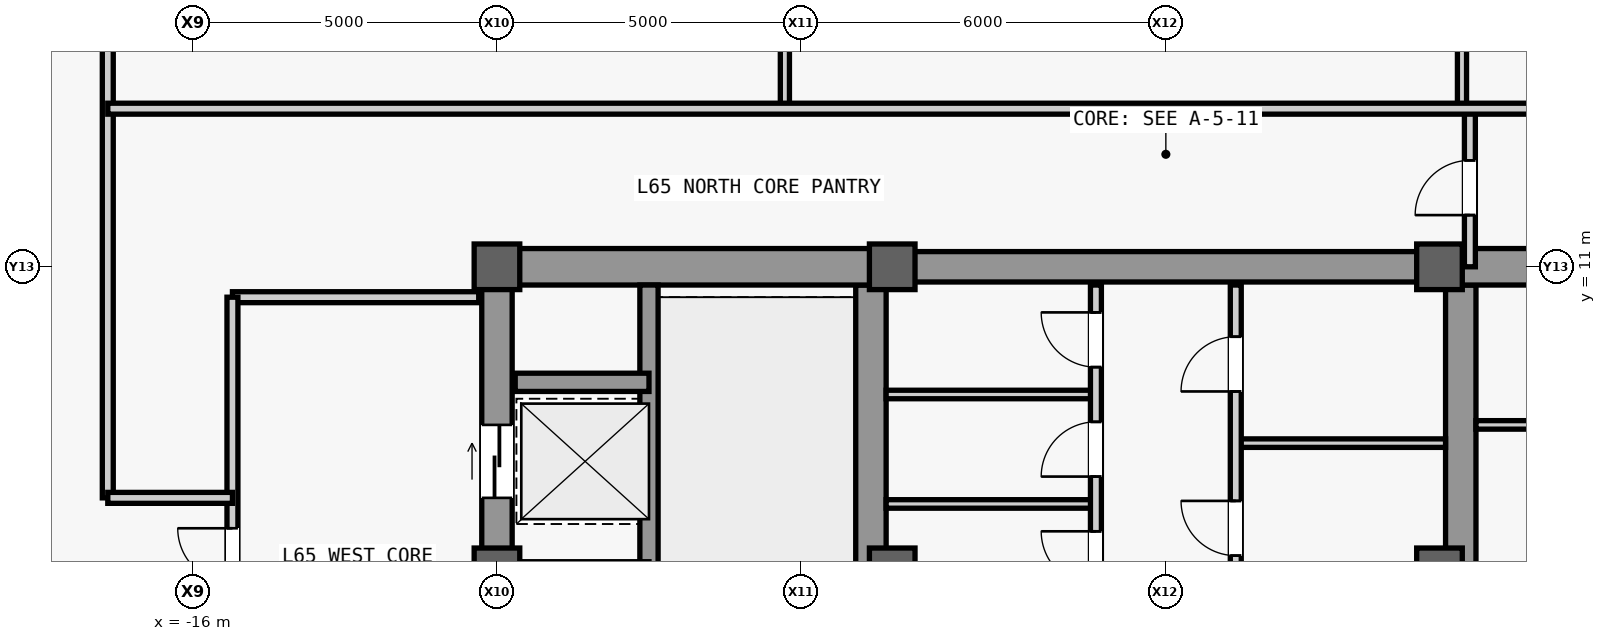
"""IFC4 building model, lengths in metres.
Left out: names, types, materials, properties, quantities, classifications, styles, units other than length and angle.
Written with IfcOpenShell. Run it as: python <this file> out.ifc"""

import sys

from ifc_helpers import new_model, si_unit, direction, frame, frame_2d, origin, origin_2d, place, context, subcontext, project, spatial, rectangle, extrude, source, transform, mapped, element, fill, save


model = new_model("IFC4")
c1 = context("Model", 3, precision=1e-05, world=origin(), true_north=direction((0.0, 1.0)))
c2 = subcontext(c1, "Body", "Model", "MODEL_VIEW")
j1 = project(units=[si_unit("LENGTHUNIT", "METRE"), si_unit("PLANEANGLEUNIT", "RADIAN")], contexts=[c1])
p1 = place(None, origin())
s1 = spatial("IfcSite", under=j1, at=p1, CompositionType="ELEMENT")
p2 = place(p1, origin())
s2 = spatial("IfcBuilding", under=s1, at=p2, CompositionType="ELEMENT")
p3 = place(p2, frame((0.0, 0.0, 277.5)))
s3 = spatial("IfcBuildingStorey", under=s2, at=p3, CompositionType="ELEMENT", Elevation=277.5)
m1 = source(origin(), c2, "Body", "SweptSolid", [
    extrude(rectangle(XDim=22.0, YDim=0.5, at=frame_2d((11.0, 0.0))), origin(), (0.0, 0.0, 1.0), 3.78),
])
p4 = place(p3, frame((-11.0, -11.0, 0.0), z_axis=(0.0, 0.0, 1.0), x_axis=(0.0, 1.0, 0.0)))
e1 = element("IfcWall", 1, at=p4, inside=s3, PredefinedType="SHEAR", context=c2, shape_type="MappedRepresentation", body=[
    mapped(m1, transform((0.0, 0.0, 0.0), scale=1.0)),
])
m2 = source(origin(), c2, "Body", "SweptSolid", [
    extrude(rectangle(XDim=1.1, YDim=2.2, at=frame_2d((0.55, 1.1))), frame((0.0, 0.26, 0.0), z_axis=(0.0, -1.0, 0.0), x_axis=(1.0, 0.0, 0.0)), (0.0, 0.0, 1.0), 0.52),
])
p5 = place(p4, frame((0.8, 0.0, 0.0)))
e2 = element("IfcOpeningElement", 2, at=p5, cuts=e1, PredefinedType="OPENING", context=c2, shape_type="MappedRepresentation", body=[
    mapped(m2, transform((0.0, 0.0, 0.0), scale=1.0)),
])
p6 = place(p4, frame((12.5, 0.0, 0.0)))
e3 = element("IfcOpeningElement", 3, at=p6, cuts=e1, PredefinedType="OPENING", context=c2, shape_type="MappedRepresentation", body=[
    mapped(m2, transform((0.0, 0.0, 0.0), scale=1.0)),
])
m3 = source(origin(), c2, "Body", "SweptSolid", [
    extrude(rectangle(XDim=0.9, YDim=2.15, at=frame_2d((0.45, 1.075))), frame((0.0, 0.26, 0.0), z_axis=(0.0, -1.0, 0.0), x_axis=(1.0, 0.0, 0.0)), (0.0, 0.0, 1.0), 0.52),
])
p7 = place(p4, frame((6.2, 0.0, 0.0)))
e4 = element("IfcOpeningElement", 4, at=p7, cuts=e1, PredefinedType="OPENING", context=c2, shape_type="MappedRepresentation", body=[
    mapped(m3, transform((0.0, 0.0, 0.0), scale=1.0)),
])
p8 = place(p4, frame((8.525, 0.0, 0.0)))
e5 = element("IfcOpeningElement", 5, at=p8, cuts=e1, PredefinedType="OPENING", context=c2, shape_type="MappedRepresentation", body=[
    mapped(m3, transform((0.0, 0.0, 0.0), scale=1.0)),
])
m4 = source(origin(), c2, "Body", "SweptSolid", [
    extrude(rectangle(XDim=1.2, YDim=2.3, at=frame_2d((0.6, 1.15))), frame((0.0, 0.26, 0.0), z_axis=(0.0, -1.0, 0.0), x_axis=(1.0, 0.0, 0.0)), (0.0, 0.0, 1.0), 0.52),
])
p9 = place(p4, frame((14.6, 0.0, 0.0)))
e6 = element("IfcOpeningElement", 6, at=p9, cuts=e1, PredefinedType="OPENING", context=c2, shape_type="MappedRepresentation", body=[
    mapped(m4, transform((0.0, 0.0, 0.0), scale=1.0)),
])
p10 = place(p4, frame((18.2, 0.0, 0.0)))
e7 = element("IfcOpeningElement", 7, at=p10, cuts=e1, PredefinedType="OPENING", context=c2, shape_type="MappedRepresentation", body=[
    mapped(m4, transform((0.0, 0.0, 0.0), scale=1.0)),
])
m5 = source(origin(), c2, "Body", "SweptSolid", [
    extrude(rectangle(XDim=1.3, YDim=2.3, at=frame_2d((0.65, 1.15))), frame((0.0, 0.26, 0.0), z_axis=(0.0, -1.0, 0.0), x_axis=(1.0, 0.0, 0.0)), (0.0, 0.0, 1.0), 0.52),
])
p11 = place(p4, frame((2.7, 0.0, 0.0)))
e8 = element("IfcOpeningElement", 8, at=p11, cuts=e1, PredefinedType="OPENING", context=c2, shape_type="MappedRepresentation", body=[
    mapped(m5, transform((0.0, 0.0, 0.0), scale=1.0)),
])
m6 = source(origin(), c2, "Body", "SweptSolid", [
    extrude(rectangle(XDim=21.4, YDim=0.5, at=frame_2d((10.7, 0.0))), origin(), (0.0, 0.0, 1.0), 3.78),
])
for number, where, z_axis, x_axis in (
    (9, (-4.85, -10.7, 0.0), (0.0, 0.0, 1.0), (0.0, 1.0, 0.0)),
    (10, (4.85, -10.7, 0.0), (0.0, 0.0, 1.0), (0.0, 1.0, 0.0)),
):
    element("IfcWall", number, at=place(p3, frame(where, z_axis=z_axis, x_axis=x_axis)), inside=s3, PredefinedType="SHEAR", context=c2, shape_type="MappedRepresentation", body=[
        mapped(m6, transform((0.0, 0.0, 0.0), scale=1.0)),
    ])
m7 = source(origin(), c2, "Body", "SweptSolid", [
    extrude(rectangle(XDim=5.9, YDim=0.6, at=frame_2d((2.95, 0.0))), origin(), (0.0, 0.0, 1.0), 3.78),
])
p12 = place(p3, frame((-10.75, 11.0, 0.0), z_axis=(0.0, 0.0, 1.0), x_axis=(1.0, 0.0, 0.0)))
e11 = element("IfcWall", 11, at=p12, inside=s3, PredefinedType="SHEAR", context=c2, shape_type="MappedRepresentation", body=[
    mapped(m7, transform((0.0, 0.0, 0.0), scale=1.0)),
])
p13 = place(p3, frame((4.85, 11.0, 0.0), z_axis=(0.0, 0.0, 1.0), x_axis=(1.0, 0.0, 0.0)))
e12 = element("IfcWall", 12, at=p13, inside=s3, PredefinedType="SHEAR", context=c2, shape_type="MappedRepresentation", body=[
    mapped(m7, transform((0.0, 0.0, 0.0), scale=1.0)),
])
m8 = source(origin(), c2, "Body", "SweptSolid", [
    extrude(rectangle(XDim=1.05, YDim=2.2, at=frame_2d((0.525, 1.1))), frame((0.0, 0.31, 0.0), z_axis=(0.0, -1.0, 0.0), x_axis=(1.0, 0.0, 0.0)), (0.0, 0.0, 1.0), 0.62),
])
p14 = place(p13, frame((1.375, 0.0, 0.0)))
e13 = element("IfcOpeningElement", 13, at=p14, cuts=e12, PredefinedType="OPENING", context=c2, shape_type="MappedRepresentation", body=[
    mapped(m8, transform((0.0, 0.0, 0.0), scale=1.0)),
])
m9 = source(origin(), c2, "Body", "SweptSolid", [
    extrude(rectangle(XDim=9.2, YDim=0.5, at=frame_2d((4.6, 0.0))), origin(), (0.0, 0.0, 1.0), 3.78),
])
p15 = place(p3, frame((-4.6, 11.0, 0.0), z_axis=(0.0, 0.0, 1.0), x_axis=(1.0, 0.0, 0.0)))
e14 = element("IfcWall", 14, at=p15, inside=s3, PredefinedType="SHEAR", context=c2, shape_type="MappedRepresentation", body=[
    mapped(m9, transform((0.0, 0.0, 0.0), scale=1.0)),
])
m10 = source(origin(), c2, "Body", "SweptSolid", [
    extrude(rectangle(XDim=0.75, YDim=0.75, at=origin_2d()), origin(), (0.0, 0.0, 1.0), 4.0),
])
for number, where, z_axis, x_axis in (
    (15, (-11.0, 6.0, 0.0), (0.0, 0.0, 1.0), (1.0, 0.0, 0.0)),
    (16, (-11.0, 11.0, 0.0), (0.0, 0.0, 1.0), (1.0, 0.0, 0.0)),
    (17, (-4.5, 6.0, 0.0), (0.0, 0.0, 1.0), (1.0, 0.0, 0.0)),
    (18, (-4.5, 11.0, 0.0), (0.0, 0.0, 1.0), (1.0, 0.0, 0.0)),
    (19, (4.5, 6.0, 0.0), (0.0, 0.0, 1.0), (1.0, 0.0, 0.0)),
    (20, (4.5, 11.0, 0.0), (0.0, 0.0, 1.0), (1.0, 0.0, 0.0)),
):
    element("IfcColumn", number, at=place(p3, frame(where, z_axis=z_axis, x_axis=x_axis)), inside=s3, PredefinedType="COLUMN", context=c2, shape_type="MappedRepresentation", body=[
        mapped(m10, transform((0.0, 0.0, 0.0), scale=1.0)),
    ])
m11 = source(origin(), c2, "Body", "SweptSolid", [
    extrude(rectangle(XDim=7.75, YDim=0.3, at=frame_2d((3.875, 0.0))), origin(), (0.0, 0.0, 1.0), 3.78),
])
p16 = place(p3, frame((-8.5, 2.95, 0.0), z_axis=(0.0, 0.0, 1.0), x_axis=(0.0, 1.0, 0.0)))
e21 = element("IfcWall", 21, at=p16, inside=s3, PredefinedType="SHEAR", context=c2, shape_type="MappedRepresentation", body=[
    mapped(m11, transform((0.0, 0.0, 0.0), scale=1.0)),
])
m12 = source(origin(), c2, "Body", "SweptSolid", [
    extrude(rectangle(XDim=2.2, YDim=0.3, at=frame_2d((1.1, 0.0))), origin(), (0.0, 0.0, 1.0), 3.78),
])
for number, where, z_axis, x_axis in (
    (22, (-10.7, 6.0, 0.0), (0.0, 0.0, 1.0), (1.0, 0.0, 0.0)),
    (23, (-10.7, 9.1, 0.0), (0.0, 0.0, 1.0), (1.0, 0.0, 0.0)),
):
    element("IfcWall", number, at=place(p3, frame(where, z_axis=z_axis, x_axis=x_axis)), inside=s3, PredefinedType="SHEAR", context=c2, shape_type="MappedRepresentation", body=[
        mapped(m12, transform((0.0, 0.0, 0.0), scale=1.0)),
    ])
m13 = source(origin(), c2, "Body", "SweptSolid", [
    extrude(rectangle(XDim=3.15, YDim=0.14, at=frame_2d((1.575, 0.0))), origin(), (0.0, 0.0, 1.0), 3.78),
])
p17 = place(p3, frame((5.1, 8.4, 0.0), z_axis=(0.0, 0.0, 1.0), x_axis=(1.0, 0.0, 0.0)))
e24 = element("IfcWall", 24, at=p17, inside=s3, PredefinedType="PARTITIONING", context=c2, shape_type="MappedRepresentation", body=[
    mapped(m13, transform((0.0, 0.0, 0.0), scale=1.0)),
])
m14 = source(origin(), c2, "Body", "SweptSolid", [
    extrude(rectangle(XDim=0.9, YDim=2.15, at=frame_2d((0.45, 1.075))), frame((0.0, 0.08, 0.0), z_axis=(0.0, -1.0, 0.0), x_axis=(1.0, 0.0, 0.0)), (0.0, 0.0, 1.0), 0.16),
])
p18 = place(p17, frame((1.13, 0.0, 0.0)))
e25 = element("IfcOpeningElement", 25, at=p18, cuts=e24, PredefinedType="OPENING", context=c2, shape_type="MappedRepresentation", body=[
    mapped(m14, transform((0.0, 0.0, 0.0), scale=1.0)),
])
m15 = source(origin(), c2, "Body", "SweptSolid", [
    extrude(rectangle(XDim=4.05, YDim=0.18, at=frame_2d((2.025, 0.0))), origin(), (0.0, 0.0, 1.0), 3.78),
])
p19 = place(p3, frame((-15.35, 10.5, 0.0), z_axis=(0.0, 0.0, 1.0), x_axis=(1.0, 0.0, 0.0)))
e26 = element("IfcWall", 26, at=p19, inside=s3, PredefinedType="PARTITIONING", context=c2, shape_type="MappedRepresentation", body=[
    mapped(m15, transform((0.0, 0.0, 0.0), scale=1.0)),
])
m16 = source(origin(), c2, "Body", "SweptSolid", [
    extrude(rectangle(XDim=16.6, YDim=0.18, at=frame_2d((8.3, 0.0))), origin(), (0.0, 0.0, 1.0), 3.78),
])
p20 = place(p3, frame((-15.35, -6.1, 0.0), z_axis=(0.0, 0.0, 1.0), x_axis=(0.0, 1.0, 0.0)))
e27 = element("IfcWall", 27, at=p20, inside=s3, PredefinedType="PARTITIONING", context=c2, shape_type="MappedRepresentation", body=[
    mapped(m16, transform((0.0, 0.0, 0.0), scale=1.0)),
])
m17 = source(origin(), c2, "Body", "SweptSolid", [
    extrude(rectangle(XDim=1.8, YDim=2.25, at=frame_2d((0.9, 1.125))), frame((0.0, 0.1, 0.0), z_axis=(0.0, -1.0, 0.0), x_axis=(1.0, 0.0, 0.0)), (0.0, 0.0, 1.0), 0.2),
])
p21 = place(p20, frame((2.7, 0.0, 0.0)))
e28 = element("IfcOpeningElement", 28, at=p21, cuts=e27, PredefinedType="OPENING", context=c2, shape_type="MappedRepresentation", body=[
    mapped(m17, transform((0.0, 0.0, 0.0), scale=1.0)),
])
p22 = place(p20, frame((11.0, 0.0, 0.0)))
e29 = element("IfcOpeningElement", 29, at=p22, cuts=e27, PredefinedType="OPENING", context=c2, shape_type="MappedRepresentation", body=[
    mapped(m17, transform((0.0, 0.0, 0.0), scale=1.0)),
])
m18 = source(origin(), c2, "Body", "SweptSolid", [
    extrude(rectangle(XDim=3.45, YDim=0.14, at=frame_2d((1.725, 0.0))), origin(), (0.0, 0.0, 1.0), 3.78),
])
for number, where, z_axis, x_axis in (
    (30, (-4.6, 7.1, 0.0), (0.0, 0.0, 1.0), (1.0, 0.0, 0.0)),
    (31, (-4.6, 8.9, 0.0), (0.0, 0.0, 1.0), (1.0, 0.0, 0.0)),
):
    element("IfcWall", number, at=place(p3, frame(where, z_axis=z_axis, x_axis=x_axis)), inside=s3, PredefinedType="PARTITIONING", context=c2, shape_type="MappedRepresentation", body=[
        mapped(m18, transform((0.0, 0.0, 0.0), scale=1.0)),
    ])
m19 = source(origin(), c2, "Body", "SweptSolid", [
    extrude(rectangle(XDim=5.4, YDim=0.18, at=frame_2d((2.7, 0.0))), origin(), (0.0, 0.0, 1.0), 3.78),
])
p23 = place(p3, frame((-1.15, 5.3, 0.0), z_axis=(0.0, 0.0, 1.0), x_axis=(0.0, 1.0, 0.0)))
e32 = element("IfcWall", 32, at=p23, inside=s3, PredefinedType="PARTITIONING", context=c2, shape_type="MappedRepresentation", body=[
    mapped(m19, transform((0.0, 0.0, 0.0), scale=1.0)),
])
m20 = source(origin(), c2, "Body", "SweptSolid", [
    extrude(rectangle(XDim=0.9, YDim=2.15, at=frame_2d((0.45, 1.075))), frame((0.0, 0.1, 0.0), z_axis=(0.0, -1.0, 0.0), x_axis=(1.0, 0.0, 0.0)), (0.0, 0.0, 1.0), 0.2),
])
p24 = place(p23, frame((0.45, 0.0, 0.0)))
e33 = element("IfcOpeningElement", 33, at=p24, cuts=e32, PredefinedType="OPENING", context=c2, shape_type="MappedRepresentation", body=[
    mapped(m20, transform((0.0, 0.0, 0.0), scale=1.0)),
])
p25 = place(p23, frame((2.25, 0.0, 0.0)))
e34 = element("IfcOpeningElement", 34, at=p25, cuts=e32, PredefinedType="OPENING", context=c2, shape_type="MappedRepresentation", body=[
    mapped(m20, transform((0.0, 0.0, 0.0), scale=1.0)),
])
p26 = place(p23, frame((4.05, 0.0, 0.0)))
e35 = element("IfcOpeningElement", 35, at=p26, cuts=e32, PredefinedType="OPENING", context=c2, shape_type="MappedRepresentation", body=[
    mapped(m20, transform((0.0, 0.0, 0.0), scale=1.0)),
])
p27 = place(p3, frame((1.15, 8.1, 0.0), z_axis=(0.0, 0.0, 1.0), x_axis=(1.0, 0.0, 0.0)))
e36 = element("IfcWall", 36, at=p27, inside=s3, PredefinedType="PARTITIONING", context=c2, shape_type="MappedRepresentation", body=[
    mapped(m18, transform((0.0, 0.0, 0.0), scale=1.0)),
])
p28 = place(p3, frame((1.15, 5.3, 0.0), z_axis=(0.0, 0.0, 1.0), x_axis=(0.0, 1.0, 0.0)))
e37 = element("IfcWall", 37, at=p28, inside=s3, PredefinedType="PARTITIONING", context=c2, shape_type="MappedRepresentation", body=[
    mapped(m19, transform((0.0, 0.0, 0.0), scale=1.0)),
])
p29 = place(p28, frame((0.95, 0.0, 0.0)))
e38 = element("IfcOpeningElement", 38, at=p29, cuts=e37, PredefinedType="OPENING", context=c2, shape_type="MappedRepresentation", body=[
    mapped(m20, transform((0.0, 0.0, 0.0), scale=1.0)),
])
p30 = place(p28, frame((3.65, 0.0, 0.0)))
e39 = element("IfcOpeningElement", 39, at=p30, cuts=e37, PredefinedType="OPENING", context=c2, shape_type="MappedRepresentation", body=[
    mapped(m20, transform((0.0, 0.0, 0.0), scale=1.0)),
])
m21 = source(origin(), c2, "Body", "SweptSolid", [
    extrude(rectangle(XDim=8.4, YDim=0.18, at=frame_2d((4.2, 0.0))), origin(), (0.0, 0.0, 1.0), 3.78),
])
p31 = place(p3, frame((-17.4, 7.2, 0.0), z_axis=(0.0, 0.0, 1.0), x_axis=(0.0, 1.0, 0.0)))
e40 = element("IfcWall", 40, at=p31, inside=s3, PredefinedType="PARTITIONING", context=c2, shape_type="MappedRepresentation", body=[
    mapped(m21, transform((0.0, 0.0, 0.0), scale=1.0)),
])
m22 = source(origin(), c2, "Body", "SweptSolid", [
    extrude(rectangle(XDim=2.05, YDim=0.18, at=frame_2d((1.025, 0.0))), origin(), (0.0, 0.0, 1.0), 3.78),
])
p32 = place(p3, frame((-17.4, 7.2, 0.0), z_axis=(0.0, 0.0, 1.0), x_axis=(1.0, 0.0, 0.0)))
e41 = element("IfcWall", 41, at=p32, inside=s3, PredefinedType="PARTITIONING", context=c2, shape_type="MappedRepresentation", body=[
    mapped(m22, transform((0.0, 0.0, 0.0), scale=1.0)),
])
m23 = source(origin(), c2, "Body", "SweptSolid", [
    extrude(rectangle(XDim=2.6, YDim=0.18, at=frame_2d((1.3, 0.0))), origin(), (0.0, 0.0, 1.0), 3.78),
])
p33 = place(p3, frame((5.0, 11.0, 0.0), z_axis=(0.0, 0.0, 1.0), x_axis=(0.0, 1.0, 0.0)))
e42 = element("IfcWall", 42, at=p33, inside=s3, PredefinedType="PARTITIONING", context=c2, shape_type="MappedRepresentation", body=[
    mapped(m23, transform((0.0, 0.0, 0.0), scale=1.0)),
])
p34 = place(p33, frame((0.85, 0.0, 0.0)))
e43 = element("IfcOpeningElement", 43, at=p34, cuts=e42, PredefinedType="OPENING", context=c2, shape_type="MappedRepresentation", body=[
    mapped(m20, transform((0.0, 0.0, 0.0), scale=1.0)),
])
m24 = source(origin(), c2, "Body", "SweptSolid", [
    extrude(rectangle(XDim=14.4, YDim=0.15, at=frame_2d((7.2, 0.0))), origin(), (0.0, 0.0, 1.0), 3.085),
])
p35 = place(p3, frame((-6.265, 13.6, 0.0), z_axis=(0.0, 0.0, 1.0), x_axis=(0.0, 1.0, 0.0)))
e44 = element("IfcWall", 44, at=p35, inside=s3, PredefinedType="PARTITIONING", context=c2, shape_type="MappedRepresentation", body=[
    mapped(m24, transform((0.0, 0.0, 0.0), scale=1.0)),
])
m25 = source(origin(), c2, "Body", "SweptSolid", [
    extrude(rectangle(XDim=0.95, YDim=2.15, at=frame_2d((0.475, 1.075))), frame((0.0, 0.085, 0.0), z_axis=(0.0, -1.0, 0.0), x_axis=(1.0, 0.0, 0.0)), (0.0, 0.0, 1.0), 0.17),
])
p36 = place(p35, frame((2.981, 0.0, 0.0)))
e45 = element("IfcOpeningElement", 45, at=p36, cuts=e44, PredefinedType="OPENING", context=c2, shape_type="MappedRepresentation", body=[
    mapped(m25, transform((0.0, 0.0, 0.0), scale=1.0)),
])
m26 = source(origin(), c2, "Body", "SweptSolid", [
    extrude(rectangle(XDim=14.4, YDim=0.15, at=frame_2d((7.2, 0.0))), origin(), (0.0, 0.0, 1.0), 3.78),
])
p37 = place(p3, frame((4.87, 13.6, 0.0), z_axis=(0.0, 0.0, 1.0), x_axis=(0.0, 1.0, 0.0)))
e46 = element("IfcWall", 46, at=p37, inside=s3, PredefinedType="PARTITIONING", context=c2, shape_type="MappedRepresentation", body=[
    mapped(m26, transform((0.0, 0.0, 0.0), scale=1.0)),
])
p38 = place(p37, frame((2.981, 0.0, 0.0)))
e47 = element("IfcOpeningElement", 47, at=p38, cuts=e46, PredefinedType="OPENING", context=c2, shape_type="MappedRepresentation", body=[
    mapped(m25, transform((0.0, 0.0, 0.0), scale=1.0)),
])
m27 = source(origin(), c2, "Body", "SweptSolid", [
    extrude(rectangle(XDim=32.75, YDim=0.18, at=frame_2d((16.375, 0.0))), origin(), (0.0, 0.0, 1.0), 3.78),
])
p39 = place(p3, frame((-17.4, 13.6, 0.0), z_axis=(0.0, 0.0, 1.0), x_axis=(1.0, 0.0, 0.0)))
e48 = element("IfcWall", 48, at=p39, inside=s3, PredefinedType="PARTITIONING", context=c2, shape_type="MappedRepresentation", body=[
    mapped(m27, transform((0.0, 0.0, 0.0), scale=1.0)),
])
m28 = source(origin(), c2, "Body", "SweptSolid", [
    extrude(rectangle(XDim=1.05, YDim=2.2, at=frame_2d((0.525, 1.1))), frame((0.0, 0.1, 0.0), z_axis=(0.0, -1.0, 0.0), x_axis=(1.0, 0.0, 0.0)), (0.0, 0.0, 1.0), 0.2),
])
p40 = place(p39, frame((27.075, 0.0, 0.0)))
e49 = element("IfcOpeningElement", 49, at=p40, cuts=e48, PredefinedType="OPENING", context=c2, shape_type="MappedRepresentation", body=[
    mapped(m28, transform((0.0, 0.0, 0.0), scale=1.0)),
])
m29 = source(origin(), c2, "Body", "SweptSolid", [
    extrude(rectangle(XDim=1.8, YDim=2.25, at=frame_2d((0.9, 1.125))), frame((0.0, 0.025, 0.0), z_axis=(0.0, -1.0, 0.0), x_axis=(1.0, 0.0, 0.0)), (0.0, 0.0, 1.0), 0.05),
])
p41 = place(p22, origin())
e50 = element("IfcDoor", 50, at=p41, inside=s3, OperationType="SINGLE_SWING_RIGHT", PredefinedType="DOOR", context=c2, shape_type="MappedRepresentation", body=[
    mapped(m29, transform((0.0, 0.0, 0.0), scale=1.0)),
])
fill(e29, e50)
m30 = source(origin(), c2, "Body", "SweptSolid", [
    extrude(rectangle(XDim=0.9, YDim=2.15, at=frame_2d((0.45, 1.075))), frame((0.0, 0.025, 0.0), z_axis=(0.0, -1.0, 0.0), x_axis=(1.0, 0.0, 0.0)), (0.0, 0.0, 1.0), 0.05),
])
p42 = place(p24, origin())
e51 = element("IfcDoor", 51, at=p42, inside=s3, OperationType="SINGLE_SWING_RIGHT", PredefinedType="DOOR", context=c2, shape_type="MappedRepresentation", body=[
    mapped(m30, transform((0.0, 0.0, 0.0), scale=1.0)),
])
fill(e33, e51)
p43 = place(p25, origin())
e52 = element("IfcDoor", 52, at=p43, inside=s3, OperationType="SINGLE_SWING_LEFT", PredefinedType="DOOR", context=c2, shape_type="MappedRepresentation", body=[
    mapped(m30, transform((0.0, 0.0, 0.0), scale=1.0)),
])
fill(e34, e52)
p44 = place(p26, origin())
e53 = element("IfcDoor", 53, at=p44, inside=s3, OperationType="SINGLE_SWING_RIGHT", PredefinedType="DOOR", context=c2, shape_type="MappedRepresentation", body=[
    mapped(m30, transform((0.0, 0.0, 0.0), scale=1.0)),
])
fill(e35, e53)
p45 = place(p29, origin())
e54 = element("IfcDoor", 54, at=p45, inside=s3, OperationType="SINGLE_SWING_RIGHT", PredefinedType="DOOR", context=c2, shape_type="MappedRepresentation", body=[
    mapped(m30, transform((0.0, 0.0, 0.0), scale=1.0)),
])
fill(e38, e54)
p46 = place(p30, origin())
e55 = element("IfcDoor", 55, at=p46, inside=s3, OperationType="SINGLE_SWING_LEFT", PredefinedType="DOOR", context=c2, shape_type="MappedRepresentation", body=[
    mapped(m30, transform((0.0, 0.0, 0.0), scale=1.0)),
])
fill(e39, e55)
p47 = place(p34, origin())
e56 = element("IfcDoor", 56, at=p47, inside=s3, OperationType="SINGLE_SWING_LEFT", PredefinedType="DOOR", context=c2, shape_type="MappedRepresentation", body=[
    mapped(m30, transform((0.0, 0.0, 0.0), scale=1.0)),
])
fill(e43, e56)
m31 = source(origin(), c2, "Body", "SweptSolid", [
    extrude(rectangle(XDim=1.2, YDim=2.3, at=frame_2d((0.6, 1.15))), frame((0.0, 0.025, 0.0), z_axis=(0.0, -1.0, 0.0), x_axis=(1.0, 0.0, 0.0)), (0.0, 0.0, 1.0), 0.05),
])
p48 = place(p10, origin())
e57 = element("IfcDoor", 57, at=p48, inside=s3, OperationType="SLIDING_TO_LEFT", PredefinedType="DOOR", context=c2, shape_type="MappedRepresentation", body=[
    mapped(m31, transform((0.0, 0.0, 0.0), scale=1.0)),
])
fill(e7, e57)
save(model, sys.argv[1])
